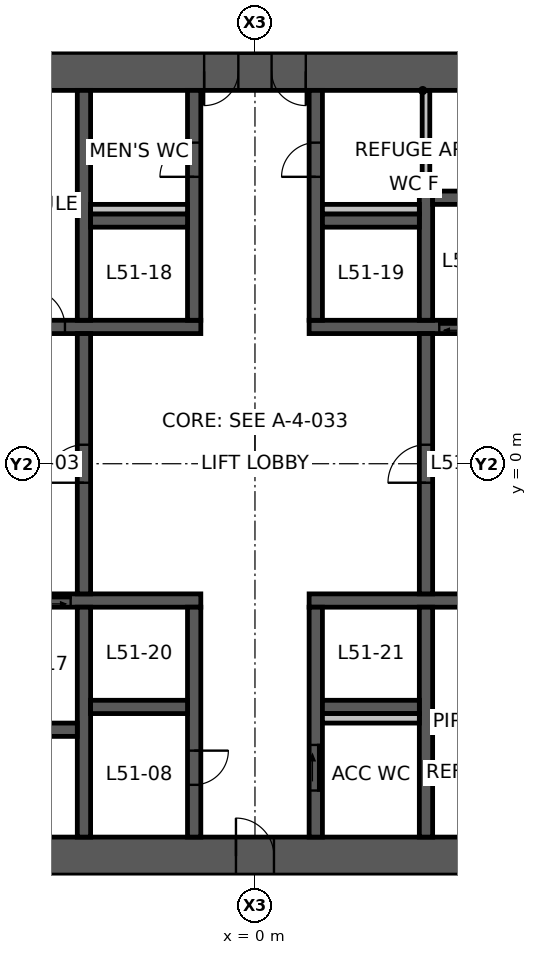
"""IFC4 building model, lengths in metres.
Left out: names, types, materials, properties, quantities, classifications, styles, units other than length and angle.
Written with IfcOpenShell. Run it as: python <this file> out.ifc"""

import sys

from ifc_helpers import new_model, si_unit, direction, frame, frame_2d, origin, place, context, subcontext, project, spatial, polyline, rectangle, outline, extrude, element, fill, save


model = new_model("IFC4")
c1 = context("Model", 3, precision=1e-05, world=origin(), true_north=direction((0.0, 1.0)))
c2 = subcontext(c1, "Body", "Model", "MODEL_VIEW")
j1 = project(units=[si_unit("LENGTHUNIT", "METRE"), si_unit("PLANEANGLEUNIT", "RADIAN")], contexts=[c1])
p1 = place(None, origin())
s1 = spatial("IfcSite", under=j1, at=p1, CompositionType="ELEMENT")
p2 = place(p1, origin())
s2 = spatial("IfcBuilding", under=s1, at=p2, CompositionType="ELEMENT")
p3 = place(p2, frame((0.0, 0.0, 203.3)))
s3 = spatial("IfcBuildingStorey", under=s2, at=p3, CompositionType="ELEMENT", Elevation=203.3)
p4 = place(p3, frame((5.961, 10.325, 0.0), z_axis=(0.0, 0.0, 1.0), x_axis=(-1.0, 0.0, 0.0)))
e1 = element("IfcWall", 1, at=p4, inside=s3, PredefinedType="SHEAR", context=c2, shape_type="SweptSolid", body=[
    extrude(outline(polyline([(-0.289, -0.5), (4.624, -0.5), (5.523, -0.5), (6.399, -0.5), (7.299, -0.5), (12.211, -0.5), (11.634, 0.5), (7.299, 0.5), (6.399, 0.5), (5.523, 0.5), (4.624, 0.5), (0.289, 0.5), (-0.289, -0.5)])), origin(), (0.0, 0.0, 1.0), 5.0),
])
p5 = place(p4, frame((6.399, 0.0, 0.0)))
e2 = element("IfcOpeningElement", 2, at=p5, cuts=e1, PredefinedType="OPENING", context=c2, shape_type="SweptSolid", body=[
    extrude(rectangle(XDim=0.9, YDim=2.1, at=frame_2d((0.45, 1.05))), frame((0.0, 0.51, 0.0), z_axis=(0.0, -1.0, 0.0), x_axis=(1.0, 0.0, 0.0)), (0.0, 0.0, 1.0), 1.02),
])
p6 = place(p4, frame((4.624, 0.0, 0.0)))
e3 = element("IfcOpeningElement", 3, at=p6, cuts=e1, PredefinedType="OPENING", context=c2, shape_type="SweptSolid", body=[
    extrude(rectangle(XDim=0.9, YDim=2.1, at=frame_2d((0.45, 1.05))), frame((0.0, 0.51, 0.0), z_axis=(0.0, -1.0, 0.0), x_axis=(1.0, 0.0, 0.0)), (0.0, 0.0, 1.0), 1.02),
])
p7 = place(p3, frame((-5.961, -10.325, 0.0), z_axis=(0.0, 0.0, 1.0), x_axis=(1.0, 0.0, 0.0)))
e4 = element("IfcWall", 4, at=p7, inside=s3, PredefinedType="SHEAR", context=c2, shape_type="SweptSolid", body=[
    extrude(outline(polyline([(-0.289, -0.5), (5.461, -0.5), (6.461, -0.5), (12.211, -0.5), (11.634, 0.5), (6.461, 0.5), (5.461, 0.5), (0.289, 0.5), (-0.289, -0.5)])), origin(), (0.0, 0.0, 1.0), 5.0),
])
p8 = place(p7, frame((5.461, 0.0, 0.0)))
e5 = element("IfcOpeningElement", 5, at=p8, cuts=e4, PredefinedType="OPENING", context=c2, shape_type="SweptSolid", body=[
    extrude(rectangle(XDim=1.0, YDim=2.1, at=frame_2d((0.5, 1.05))), frame((0.0, 0.51, 0.0), z_axis=(0.0, -1.0, 0.0), x_axis=(1.0, 0.0, 0.0)), (0.0, 0.0, 1.0), 1.02),
])
p9 = place(p3, frame((0.0, 10.825, 0.0), z_axis=(0.0, 0.0, 1.0), x_axis=(0.0, 1.0, 0.0)))
e6 = element("IfcWall", 6, at=p9, inside=s3, PredefinedType="SHEAR", context=c2, shape_type="SweptSolid", body=[
    extrude(rectangle(XDim=6.946, YDim=0.7, at=frame_2d((3.473, 0.0))), origin(), (0.0, 0.0, 1.0), 5.0),
])
p10 = place(p9, frame((0.9, 0.0, 0.0)))
e7 = element("IfcOpeningElement", 7, at=p10, cuts=e6, PredefinedType="OPENING", context=c2, shape_type="SweptSolid", body=[
    extrude(rectangle(XDim=1.0, YDim=2.1, at=frame_2d((0.5, 1.05))), frame((0.0, 0.36, 0.0), z_axis=(0.0, -1.0, 0.0), x_axis=(1.0, 0.0, 0.0)), (0.0, 0.0, 1.0), 0.72),
])
p11 = place(p3, frame((-9.266, 3.6, 0.0), z_axis=(0.0, 0.0, 1.0), x_axis=(1.0, 0.0, 0.0)))
e8 = element("IfcWall", 8, at=p11, inside=s3, PredefinedType="SHEAR", context=c2, shape_type="SweptSolid", body=[
    extrude(outline(polyline([(-0.101, -0.175), (3.266, -0.175), (4.266, -0.175), (7.841, -0.175), (7.841, 0.175), (4.266, 0.175), (3.266, 0.175), (0.101, 0.175), (-0.101, -0.175)])), origin(), (0.0, 0.0, 1.0), 5.0),
])
p12 = place(p11, frame((3.266, 0.0, 0.0)))
e9 = element("IfcOpeningElement", 9, at=p12, cuts=e8, PredefinedType="OPENING", context=c2, shape_type="SweptSolid", body=[
    extrude(rectangle(XDim=1.0, YDim=2.1, at=frame_2d((0.5, 1.05))), frame((0.0, 0.185, 0.0), z_axis=(0.0, -1.0, 0.0), x_axis=(1.0, 0.0, 0.0)), (0.0, 0.0, 1.0), 0.37),
])
p13 = place(p3, frame((1.425, 3.6, 0.0), z_axis=(0.0, 0.0, 1.0), x_axis=(1.0, 0.0, 0.0)))
e10 = element("IfcWall", 10, at=p13, inside=s3, PredefinedType="SHEAR", context=c2, shape_type="SweptSolid", body=[
    extrude(outline(polyline([(0.0, -0.175), (3.425, -0.175), (4.725, -0.175), (7.942, -0.175), (7.74, 0.175), (4.725, 0.175), (3.425, 0.175), (0.0, 0.175), (0.0, -0.175)])), origin(), (0.0, 0.0, 1.0), 5.0),
])
p14 = place(p13, frame((3.425, 0.0, 0.0)))
e11 = element("IfcOpeningElement", 11, at=p14, cuts=e10, PredefinedType="OPENING", context=c2, shape_type="SweptSolid", body=[
    extrude(rectangle(XDim=1.3, YDim=2.1, at=frame_2d((0.65, 1.05))), frame((0.0, 0.185, 0.0), z_axis=(0.0, -1.0, 0.0), x_axis=(1.0, 0.0, 0.0)), (0.0, 0.0, 1.0), 0.37),
])
p15 = place(p3, frame((-9.266, -3.6, 0.0), z_axis=(0.0, 0.0, 1.0), x_axis=(1.0, 0.0, 0.0)))
e12 = element("IfcWall", 12, at=p15, inside=s3, PredefinedType="SHEAR", context=c2, shape_type="SweptSolid", body=[
    extrude(outline(polyline([(0.101, -0.175), (3.116, -0.175), (4.417, -0.175), (7.841, -0.175), (7.841, 0.175), (4.417, 0.175), (3.116, 0.175), (-0.101, 0.175), (0.101, -0.175)])), origin(), (0.0, 0.0, 1.0), 5.0),
])
p16 = place(p15, frame((3.116, 0.0, 0.0)))
e13 = element("IfcOpeningElement", 13, at=p16, cuts=e12, PredefinedType="OPENING", context=c2, shape_type="SweptSolid", body=[
    extrude(rectangle(XDim=1.3, YDim=2.1, at=frame_2d((0.65, 1.05))), frame((0.0, 0.185, 0.0), z_axis=(0.0, -1.0, 0.0), x_axis=(1.0, 0.0, 0.0)), (0.0, 0.0, 1.0), 0.37),
])
p17 = place(p3, frame((1.425, -3.6, 0.0), z_axis=(0.0, 0.0, 1.0), x_axis=(1.0, 0.0, 0.0)))
e14 = element("IfcWall", 14, at=p17, inside=s3, PredefinedType="SHEAR", context=c2, shape_type="SweptSolid", body=[
    extrude(outline(polyline([(0.0, -0.175), (7.74, -0.175), (7.942, 0.175), (0.0, 0.175), (0.0, -0.175)])), origin(), (0.0, 0.0, 1.0), 5.0),
])
p18 = place(p3, frame((-1.6, 3.775, 0.0), z_axis=(0.0, 0.0, 1.0), x_axis=(0.0, 1.0, 0.0)))
e15 = element("IfcWall", 15, at=p18, inside=s3, PredefinedType="SHEAR", context=c2, shape_type="SweptSolid", body=[
    extrude(rectangle(XDim=6.05, YDim=0.35, at=frame_2d((3.025, 0.0))), origin(), (0.0, 0.0, 1.0), 5.0),
])
p19 = place(p18, frame((3.775, 0.0, 0.0)))
e16 = element("IfcOpeningElement", 16, at=p19, cuts=e15, PredefinedType="OPENING", context=c2, shape_type="SweptSolid", body=[
    extrude(rectangle(XDim=0.9, YDim=2.1, at=frame_2d((0.45, 1.05))), frame((0.0, 0.185, 0.0), z_axis=(0.0, -1.0, 0.0), x_axis=(1.0, 0.0, 0.0)), (0.0, 0.0, 1.0), 0.37),
])
p20 = place(p3, frame((1.6, 3.775, 0.0), z_axis=(0.0, 0.0, 1.0), x_axis=(0.0, 1.0, 0.0)))
e17 = element("IfcWall", 17, at=p20, inside=s3, PredefinedType="SHEAR", context=c2, shape_type="SweptSolid", body=[
    extrude(rectangle(XDim=6.05, YDim=0.35, at=frame_2d((3.025, 0.0))), origin(), (0.0, 0.0, 1.0), 5.0),
])
p21 = place(p20, frame((3.775, 0.0, 0.0)))
e18 = element("IfcOpeningElement", 18, at=p21, cuts=e17, PredefinedType="OPENING", context=c2, shape_type="SweptSolid", body=[
    extrude(rectangle(XDim=0.9, YDim=2.1, at=frame_2d((0.45, 1.05))), frame((0.0, 0.185, 0.0), z_axis=(0.0, -1.0, 0.0), x_axis=(1.0, 0.0, 0.0)), (0.0, 0.0, 1.0), 0.37),
])
p22 = place(p3, frame((-1.6, -3.775, 0.0), z_axis=(0.0, 0.0, 1.0), x_axis=(0.0, -1.0, 0.0)))
e19 = element("IfcWall", 19, at=p22, inside=s3, PredefinedType="SHEAR", context=c2, shape_type="SweptSolid", body=[
    extrude(rectangle(XDim=6.05, YDim=0.35, at=frame_2d((3.025, 0.0))), origin(), (0.0, 0.0, 1.0), 5.0),
])
p23 = place(p22, frame((3.775, 0.0, 0.0)))
e20 = element("IfcOpeningElement", 20, at=p23, cuts=e19, PredefinedType="OPENING", context=c2, shape_type="SweptSolid", body=[
    extrude(rectangle(XDim=0.9, YDim=2.1, at=frame_2d((0.45, 1.05))), frame((0.0, 0.185, 0.0), z_axis=(0.0, -1.0, 0.0), x_axis=(1.0, 0.0, 0.0)), (0.0, 0.0, 1.0), 0.37),
])
p24 = place(p3, frame((1.6, -3.775, 0.0), z_axis=(0.0, 0.0, 1.0), x_axis=(0.0, -1.0, 0.0)))
e21 = element("IfcWall", 21, at=p24, inside=s3, PredefinedType="SHEAR", context=c2, shape_type="SweptSolid", body=[
    extrude(rectangle(XDim=6.05, YDim=0.35, at=frame_2d((3.025, 0.0))), origin(), (0.0, 0.0, 1.0), 5.0),
])
p25 = place(p24, frame((3.625, 0.0, 0.0)))
e22 = element("IfcOpeningElement", 22, at=p25, cuts=e21, PredefinedType="OPENING", context=c2, shape_type="SweptSolid", body=[
    extrude(rectangle(XDim=1.2, YDim=2.1, at=frame_2d((0.6, 1.05))), frame((0.0, 0.185, 0.0), z_axis=(0.0, -1.0, 0.0), x_axis=(1.0, 0.0, 0.0)), (0.0, 0.0, 1.0), 0.37),
])
p26 = place(p3, frame((-4.5, -3.425, 0.0), z_axis=(0.0, 0.0, 1.0), x_axis=(0.0, 1.0, 0.0)))
e23 = element("IfcWall", 23, at=p26, inside=s3, PredefinedType="SHEAR", context=c2, shape_type="SweptSolid", body=[
    extrude(rectangle(XDim=6.85, YDim=0.35, at=frame_2d((3.425, 0.0))), origin(), (0.0, 0.0, 1.0), 5.0),
])
p27 = place(p26, frame((2.925, 0.0, 0.0)))
e24 = element("IfcOpeningElement", 24, at=p27, cuts=e23, PredefinedType="OPENING", context=c2, shape_type="SweptSolid", body=[
    extrude(rectangle(XDim=1.0, YDim=2.1, at=frame_2d((0.5, 1.05))), frame((0.0, 0.185, 0.0), z_axis=(0.0, -1.0, 0.0), x_axis=(1.0, 0.0, 0.0)), (0.0, 0.0, 1.0), 0.37),
])
p28 = place(p3, frame((4.5, -3.425, 0.0), z_axis=(0.0, 0.0, 1.0), x_axis=(0.0, 1.0, 0.0)))
e25 = element("IfcWall", 25, at=p28, inside=s3, PredefinedType="SHEAR", context=c2, shape_type="SweptSolid", body=[
    extrude(rectangle(XDim=6.85, YDim=0.35, at=frame_2d((3.425, 0.0))), origin(), (0.0, 0.0, 1.0), 5.0),
])
p29 = place(p28, frame((2.925, 0.0, 0.0)))
e26 = element("IfcOpeningElement", 26, at=p29, cuts=e25, PredefinedType="OPENING", context=c2, shape_type="SweptSolid", body=[
    extrude(rectangle(XDim=1.0, YDim=2.1, at=frame_2d((0.5, 1.05))), frame((0.0, 0.185, 0.0), z_axis=(0.0, -1.0, 0.0), x_axis=(1.0, 0.0, 0.0)), (0.0, 0.0, 1.0), 0.37),
])
p30 = place(p3, frame((-4.5, 3.775, 0.0), z_axis=(0.0, 0.0, 1.0), x_axis=(0.0, 1.0, 0.0)))
e27 = element("IfcWall", 27, at=p30, inside=s3, PredefinedType="SHEAR", context=c2, shape_type="SweptSolid", body=[
    extrude(rectangle(XDim=6.05, YDim=0.35, at=frame_2d((3.025, 0.0))), origin(), (0.0, 0.0, 1.0), 5.0),
])
p31 = place(p3, frame((4.5, 3.775, 0.0), z_axis=(0.0, 0.0, 1.0), x_axis=(0.0, 1.0, 0.0)))
e28 = element("IfcWall", 28, at=p31, inside=s3, PredefinedType="SHEAR", context=c2, shape_type="SweptSolid", body=[
    extrude(rectangle(XDim=3.4, YDim=0.35, at=frame_2d((1.7, 0.0))), origin(), (0.0, 0.0, 1.0), 5.0),
])
for number, where, z_axis, x_axis in (
    (29, (-4.5, -3.775, 0.0), (0.0, 0.0, 1.0), (0.0, -1.0, 0.0)),
    (30, (4.5, -3.775, 0.0), (0.0, 0.0, 1.0), (0.0, -1.0, 0.0)),
):
    element("IfcWall", number, at=place(p3, frame(where, z_axis=z_axis, x_axis=x_axis)), inside=s3, PredefinedType="SHEAR", context=c2, shape_type="SweptSolid", body=[
        extrude(rectangle(XDim=6.05, YDim=0.35, at=frame_2d((3.025, 0.0))), origin(), (0.0, 0.0, 1.0), 5.0),
    ])
for number, where, z_axis, x_axis in (
    (31, (-4.325, 6.4, 0.0), (0.0, 0.0, 1.0), (1.0, 0.0, 0.0)),
    (32, (1.775, 6.4, 0.0), (0.0, 0.0, 1.0), (1.0, 0.0, 0.0)),
    (33, (-4.325, -6.4, 0.0), (0.0, 0.0, 1.0), (1.0, 0.0, 0.0)),
    (34, (1.775, -6.4, 0.0), (0.0, 0.0, 1.0), (1.0, 0.0, 0.0)),
):
    element("IfcWall", number, at=place(p3, frame(where, z_axis=z_axis, x_axis=x_axis)), inside=s3, PredefinedType="SHEAR", context=c2, shape_type="SweptSolid", body=[
        extrude(rectangle(XDim=2.55, YDim=0.35, at=frame_2d((1.275, 0.0))), origin(), (0.0, 0.0, 1.0), 5.0),
    ])
for number, where, z_axis, x_axis in (
    (35, (-6.925, -7.0, 0.0), (0.0, 0.0, 1.0), (1.0, 0.0, 0.0)),
    (36, (4.675, 7.0, 0.0), (0.0, 0.0, 1.0), (1.0, 0.0, 0.0)),
):
    element("IfcWall", number, at=place(p3, frame(where, z_axis=z_axis, x_axis=x_axis)), inside=s3, PredefinedType="SHEAR", context=c2, shape_type="SweptSolid", body=[
        extrude(rectangle(XDim=2.25, YDim=0.35, at=frame_2d((1.125, 0.0))), origin(), (0.0, 0.0, 1.0), 5.0),
    ])
p32 = place(p3, frame((4.5, 7.175, 0.0), z_axis=(0.0, 0.0, 1.0), x_axis=(0.0, 1.0, 0.0)))
e37 = element("IfcWall", 37, at=p32, inside=s3, PredefinedType="STANDARD", context=c2, shape_type="SweptSolid", body=[
    extrude(rectangle(XDim=2.65, YDim=0.2, at=frame_2d((1.325, 0.0))), origin(), (0.0, 0.0, 1.0), 5.0),
])
for number, where, z_axis, x_axis in (
    (38, (-4.325, 6.7, 0.0), (0.0, 0.0, 1.0), (1.0, 0.0, 0.0)),
    (39, (1.775, 6.7, 0.0), (0.0, 0.0, 1.0), (1.0, 0.0, 0.0)),
    (40, (1.775, -6.7, 0.0), (0.0, 0.0, 1.0), (1.0, 0.0, 0.0)),
):
    element("IfcWall", number, at=place(p3, frame(where, z_axis=z_axis, x_axis=x_axis)), inside=s3, PredefinedType="PLUMBINGWALL", context=c2, shape_type="SweptSolid", body=[
        extrude(rectangle(XDim=2.55, YDim=0.25, at=frame_2d((1.275, 0.0))), origin(), (0.0, 0.0, 1.0), 5.0),
    ])
p33 = place(p5, origin())
e41 = element("IfcDoor", 41, at=p33, inside=s3, OperationType="SINGLE_SWING_RIGHT", PredefinedType="DOOR", context=c2, shape_type="SweptSolid", body=[
    extrude(rectangle(XDim=0.9, YDim=2.1, at=frame_2d((0.45, 1.05))), frame((0.0, 0.025, 0.0), z_axis=(0.0, -1.0, 0.0), x_axis=(1.0, 0.0, 0.0)), (0.0, 0.0, 1.0), 0.05),
])
fill(e2, e41)
p34 = place(p6, origin())
e42 = element("IfcDoor", 42, at=p34, inside=s3, OperationType="SINGLE_SWING_LEFT", PredefinedType="DOOR", context=c2, shape_type="SweptSolid", body=[
    extrude(rectangle(XDim=0.9, YDim=2.1, at=frame_2d((0.45, 1.05))), frame((0.0, 0.025, 0.0), z_axis=(0.0, -1.0, 0.0), x_axis=(1.0, 0.0, 0.0)), (0.0, 0.0, 1.0), 0.05),
])
fill(e3, e42)
p35 = place(p8, origin())
e43 = element("IfcDoor", 43, at=p35, inside=s3, OperationType="SINGLE_SWING_LEFT", PredefinedType="DOOR", context=c2, shape_type="SweptSolid", body=[
    extrude(rectangle(XDim=1.0, YDim=2.1, at=frame_2d((0.5, 1.05))), frame((0.0, 0.025, 0.0), z_axis=(0.0, -1.0, 0.0), x_axis=(1.0, 0.0, 0.0)), (0.0, 0.0, 1.0), 0.05),
])
fill(e5, e43)
p36 = place(p29, origin())
e44 = element("IfcDoor", 44, at=p36, inside=s3, OperationType="SINGLE_SWING_LEFT", PredefinedType="DOOR", context=c2, shape_type="SweptSolid", body=[
    extrude(rectangle(XDim=1.0, YDim=2.1, at=frame_2d((0.5, 1.05))), frame((0.0, 0.025, 0.0), z_axis=(0.0, -1.0, 0.0), x_axis=(1.0, 0.0, 0.0)), (0.0, 0.0, 1.0), 0.05),
])
fill(e26, e44)
p37 = place(p27, origin())
e45 = element("IfcDoor", 45, at=p37, inside=s3, OperationType="SINGLE_SWING_LEFT", PredefinedType="DOOR", context=c2, shape_type="SweptSolid", body=[
    extrude(rectangle(XDim=1.0, YDim=2.1, at=frame_2d((0.5, 1.05))), frame((0.0, 0.025, 0.0), z_axis=(0.0, -1.0, 0.0), x_axis=(1.0, 0.0, 0.0)), (0.0, 0.0, 1.0), 0.05),
])
fill(e24, e45)
p38 = place(p12, origin())
e46 = element("IfcDoor", 46, at=p38, inside=s3, OperationType="SINGLE_SWING_LEFT", PredefinedType="DOOR", context=c2, shape_type="SweptSolid", body=[
    extrude(rectangle(XDim=1.0, YDim=2.1, at=frame_2d((0.5, 1.05))), frame((0.0, 0.025, 0.0), z_axis=(0.0, -1.0, 0.0), x_axis=(1.0, 0.0, 0.0)), (0.0, 0.0, 1.0), 0.05),
])
fill(e9, e46)
p39 = place(p19, origin())
e47 = element("IfcDoor", 47, at=p39, inside=s3, OperationType="SINGLE_SWING_LEFT", PredefinedType="DOOR", context=c2, shape_type="SweptSolid", body=[
    extrude(rectangle(XDim=0.9, YDim=2.1, at=frame_2d((0.45, 1.05))), frame((0.0, 0.025, 0.0), z_axis=(0.0, -1.0, 0.0), x_axis=(1.0, 0.0, 0.0)), (0.0, 0.0, 1.0), 0.05),
])
fill(e16, e47)
p40 = place(p21, origin())
e48 = element("IfcDoor", 48, at=p40, inside=s3, OperationType="SINGLE_SWING_LEFT", PredefinedType="DOOR", context=c2, shape_type="SweptSolid", body=[
    extrude(rectangle(XDim=0.9, YDim=2.1, at=frame_2d((0.45, 1.05))), frame((0.0, 0.025, 0.0), z_axis=(0.0, -1.0, 0.0), x_axis=(1.0, 0.0, 0.0)), (0.0, 0.0, 1.0), 0.05),
])
fill(e18, e48)
p41 = place(p25, origin())
e49 = element("IfcDoor", 49, at=p41, inside=s3, OperationType="SLIDING_TO_LEFT", PredefinedType="DOOR", context=c2, shape_type="SweptSolid", body=[
    extrude(rectangle(XDim=1.2, YDim=2.1, at=frame_2d((0.6, 1.05))), frame((0.0, 0.025, 0.0), z_axis=(0.0, -1.0, 0.0), x_axis=(1.0, 0.0, 0.0)), (0.0, 0.0, 1.0), 0.05),
])
fill(e22, e49)
p42 = place(p23, origin())
e50 = element("IfcDoor", 50, at=p42, inside=s3, OperationType="SINGLE_SWING_LEFT", PredefinedType="DOOR", context=c2, shape_type="SweptSolid", body=[
    extrude(rectangle(XDim=0.9, YDim=2.1, at=frame_2d((0.45, 1.05))), frame((0.0, 0.025, 0.0), z_axis=(0.0, -1.0, 0.0), x_axis=(1.0, 0.0, 0.0)), (0.0, 0.0, 1.0), 0.05),
])
fill(e20, e50)
p43 = place(p14, origin())
e51 = element("IfcDoor", 51, at=p43, inside=s3, OperationType="DOUBLE_DOOR_SLIDING", PredefinedType="DOOR", context=c2, shape_type="SweptSolid", body=[
    extrude(rectangle(XDim=1.3, YDim=2.1, at=frame_2d((0.65, 1.05))), frame((0.0, 0.025, 0.0), z_axis=(0.0, -1.0, 0.0), x_axis=(1.0, 0.0, 0.0)), (0.0, 0.0, 1.0), 0.05),
])
fill(e11, e51)
p44 = place(p16, origin())
e52 = element("IfcDoor", 52, at=p44, inside=s3, OperationType="DOUBLE_DOOR_SLIDING", PredefinedType="DOOR", context=c2, shape_type="SweptSolid", body=[
    extrude(rectangle(XDim=1.3, YDim=2.1, at=frame_2d((0.65, 1.05))), frame((0.0, 0.025, 0.0), z_axis=(0.0, -1.0, 0.0), x_axis=(1.0, 0.0, 0.0)), (0.0, 0.0, 1.0), 0.05),
])
fill(e13, e52)
save(model, sys.argv[1])
